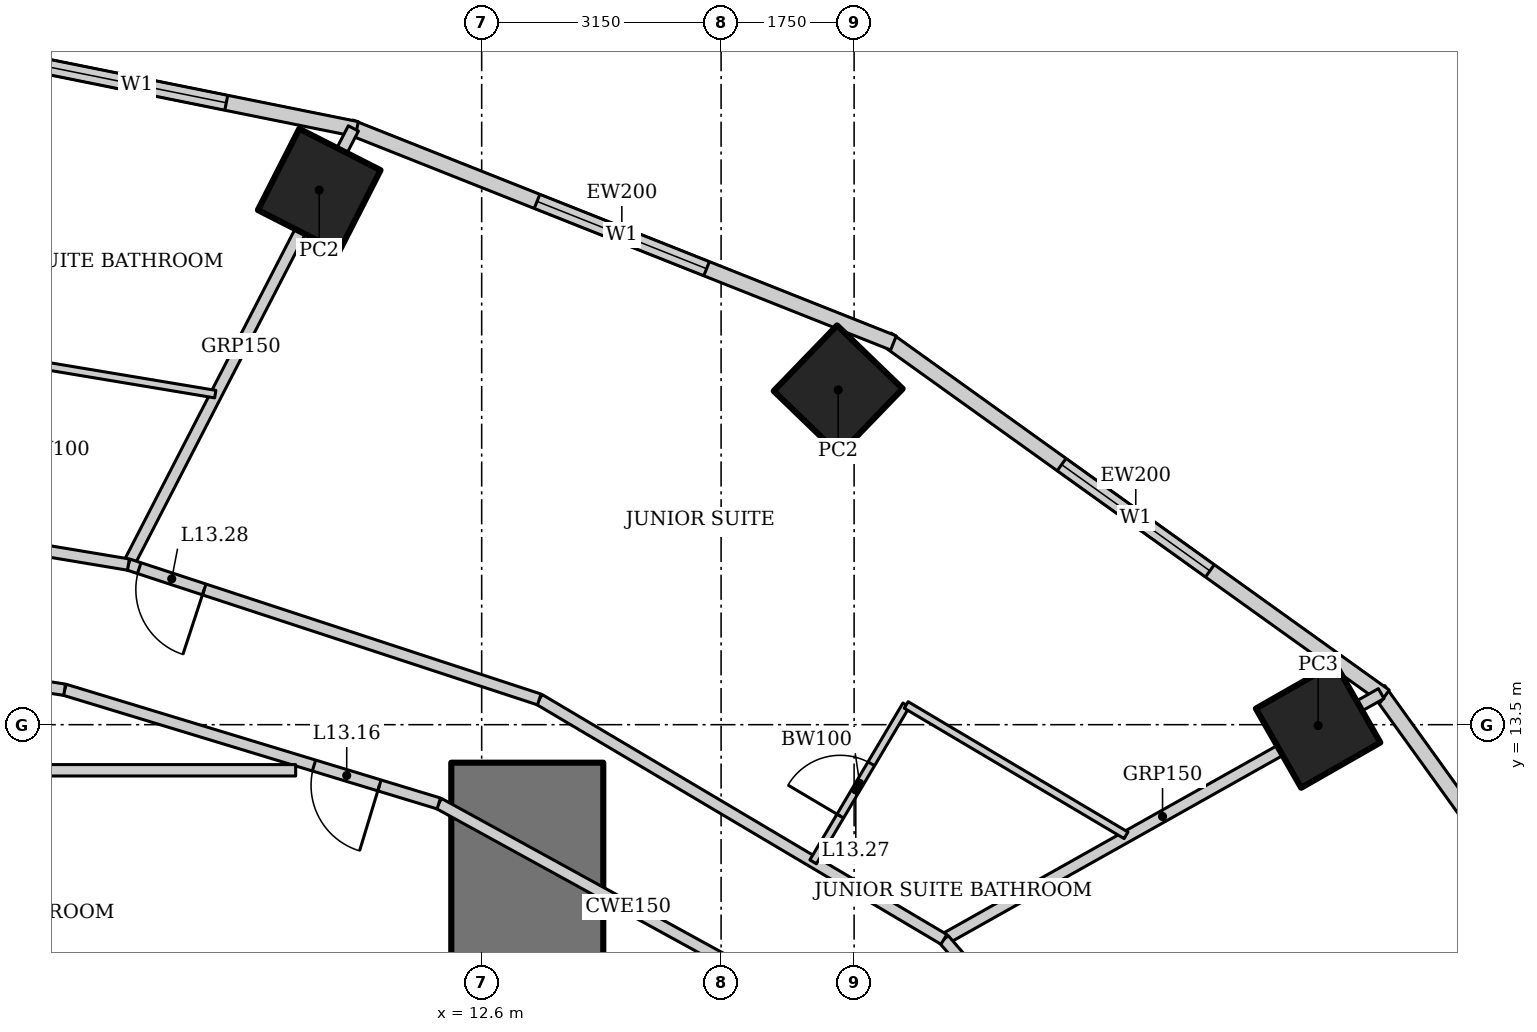
"""IFC4 building model, lengths in metres.
Left out: names, types, materials, properties, quantities, classifications, styles, units other than length and angle.
Written with IfcOpenShell. Run it as: python <this file> out.ifc"""

import sys

from ifc_helpers import new_model, si_unit, direction, frame, frame_2d, origin, origin_2d, place, context, subcontext, project, spatial, rectangle, hollow_rectangle, extrude, element, fill, save


model = new_model("IFC4")
c1 = context("Model", 3, precision=1e-05, world=origin(), true_north=direction((0.0, 1.0)))
c2 = subcontext(c1, "Body", "Model", "MODEL_VIEW")
j1 = project(units=[si_unit("LENGTHUNIT", "METRE"), si_unit("PLANEANGLEUNIT", "RADIAN")], contexts=[c1])
p1 = place(None, origin())
s1 = spatial("IfcSite", under=j1, at=p1, CompositionType="ELEMENT")
p2 = place(p1, origin())
s2 = spatial("IfcBuilding", under=s1, at=p2, CompositionType="ELEMENT")
p3 = place(p2, frame((0.0, 0.0, 62.2)))
s3 = spatial("IfcBuildingStorey", under=s2, at=p3, CompositionType="ELEMENT", Elevation=62.2)
p4 = place(p3, frame((23.605, 13.489, 0.0), z_axis=(0.0, 0.0, 1.0), x_axis=(0.86824298017, 0.496139221777, 0.0)))
e1 = element("IfcColumn", 1, at=p4, inside=s3, PredefinedType="COLUMN", context=c2, shape_type="SweptSolid", body=[
    extrude(hollow_rectangle(XDim=1.2, YDim=1.2, WallThickness=0.12, at=origin_2d()), origin(), (0.0, 0.0, 1.0), 3.6),
])
for number, where, z_axis, x_axis in (
    (2, (17.291, 17.905, 0.0), (0.0, 0.0, 1.0), (0.695, 0.719, 0.0)),
    (3, (10.463, 20.534, 0.0), (0.0, 0.0, 1.0), (0.454, 0.891, 0.0)),
):
    element("IfcColumn", number, at=place(p3, frame(where, z_axis=z_axis, x_axis=x_axis)), inside=s3, PredefinedType="COLUMN", context=c2, shape_type="SweptSolid", body=[
        extrude(hollow_rectangle(XDim=1.2, YDim=1.2, WallThickness=0.1, at=origin_2d()), origin(), (0.0, 0.0, 1.0), 3.6),
    ])
p5 = place(p3, frame((13.2, -13.0, 0.0), z_axis=(0.0, 0.0, 1.0), x_axis=(0.0, 1.0, 0.0)))
e4 = element("IfcWall", 4, at=p5, inside=s3, PredefinedType="SHEAR", context=c2, shape_type="SweptSolid", body=[
    extrude(rectangle(XDim=26.0, YDim=2.0, at=frame_2d((13.0, 0.0))), origin(), (0.0, 0.0, 1.0), 3.6),
])
p6 = place(p5, frame((12.1, 0.0, 0.0)))
e5 = element("IfcOpeningElement", 5, at=p6, cuts=e4, PredefinedType="OPENING", context=c2, shape_type="SweptSolid", body=[
    extrude(rectangle(XDim=1.8, YDim=2.1, at=frame_2d((0.9, 1.05))), frame((0.0, 1.01, 0.0), z_axis=(0.0, -1.0, 0.0), x_axis=(1.0, 0.0, 0.0)), (0.0, 0.0, 1.0), 2.02),
])
p7 = place(p3, frame((29.26, 7.2, 0.0), z_axis=(0.0, 0.0, 1.0), x_axis=(-0.583937613703, 0.811798536155, 0.0)))
e6 = element("IfcWall", 6, at=p7, inside=s3, PredefinedType="SOLIDWALL", context=c2, shape_type="SweptSolid", body=[
    extrude(rectangle(XDim=8.323, YDim=0.2, at=frame_2d((4.162, 0.0))), origin(), (0.0, 0.0, 1.0), 3.45),
])
p8 = place(p7, frame((2.961, 0.0, 0.5)))
e7 = element("IfcOpeningElement", 7, at=p8, cuts=e6, PredefinedType="OPENING", context=c2, shape_type="SweptSolid", body=[
    extrude(rectangle(XDim=2.4, YDim=2.2, at=frame_2d((1.2, 1.1))), frame((0.0, 0.11, 0.0), z_axis=(0.0, -1.0, 0.0), x_axis=(1.0, 0.0, 0.0)), (0.0, 0.0, 1.0), 0.22),
])
p9 = place(p3, frame((24.482, 13.875, 0.0), z_axis=(0.0, 0.0, 1.0), x_axis=(-0.812791321576, 0.582554948112, 0.0)))
e8 = element("IfcWall", 8, at=p9, inside=s3, PredefinedType="SOLIDWALL", context=c2, shape_type="SweptSolid", body=[
    extrude(rectangle(XDim=8.063, YDim=0.2, at=frame_2d((4.032, 0.0))), origin(), (0.0, 0.0, 1.0), 3.45),
])
p10 = place(p9, frame((2.832, 0.0, 0.5)))
e9 = element("IfcOpeningElement", 9, at=p10, cuts=e8, PredefinedType="OPENING", context=c2, shape_type="SweptSolid", body=[
    extrude(rectangle(XDim=2.4, YDim=2.2, at=frame_2d((1.2, 1.1))), frame((0.0, 0.11, 0.0), z_axis=(0.0, -1.0, 0.0), x_axis=(1.0, 0.0, 0.0)), (0.0, 0.0, 1.0), 0.22),
])
p11 = place(p3, frame((18.018, 18.523, 0.0), z_axis=(0.0, 0.0, 1.0), x_axis=(-0.929358351251, 0.369178892895, 0.0)))
e10 = element("IfcWall", 10, at=p11, inside=s3, PredefinedType="SOLIDWALL", context=c2, shape_type="SweptSolid", body=[
    extrude(rectangle(XDim=7.692, YDim=0.2, at=frame_2d((3.846, 0.0))), origin(), (0.0, 0.0, 1.0), 3.45),
])
p12 = place(p11, frame((2.646, 0.0, 0.5)))
e11 = element("IfcOpeningElement", 11, at=p12, cuts=e10, PredefinedType="OPENING", context=c2, shape_type="SweptSolid", body=[
    extrude(rectangle(XDim=2.4, YDim=2.2, at=frame_2d((1.2, 1.1))), frame((0.0, 0.11, 0.0), z_axis=(0.0, -1.0, 0.0), x_axis=(1.0, 0.0, 0.0)), (0.0, 0.0, 1.0), 0.22),
])
p13 = place(p3, frame((10.957, 21.337, 0.0), z_axis=(0.0, 0.0, 1.0), x_axis=(-0.980251657452, 0.197754110105, 0.0)))
e12 = element("IfcWall", 12, at=p13, inside=s3, PredefinedType="SOLIDWALL", context=c2, shape_type="SweptSolid", body=[
    extrude(rectangle(XDim=5.904, YDim=0.2, at=frame_2d((2.952, 0.0))), origin(), (0.0, 0.0, 1.0), 3.45),
])
p14 = place(p13, frame((1.752, 0.0, 0.5)))
e13 = element("IfcOpeningElement", 13, at=p14, cuts=e12, PredefinedType="OPENING", context=c2, shape_type="SweptSolid", body=[
    extrude(rectangle(XDim=2.4, YDim=2.2, at=frame_2d((1.2, 1.1))), frame((0.0, 0.11, 0.0), z_axis=(0.0, -1.0, 0.0), x_axis=(1.0, 0.0, 0.0)), (0.0, 0.0, 1.0), 0.22),
])
p15 = place(p3, frame((24.435, 13.909, 0.0), z_axis=(0.0, 0.0, 1.0), x_axis=(-0.871747379892, -0.489955616001, 0.0)))
e14 = element("IfcWall", 14, at=p15, inside=s3, PredefinedType="PARTITIONING", context=c2, shape_type="SweptSolid", body=[
    extrude(rectangle(XDim=6.6, YDim=0.15, at=frame_2d((3.3, 0.0))), origin(), (0.0, 0.0, 1.0), 2.693),
])
p16 = place(p3, frame((10.912, 21.346, 0.0), z_axis=(0.0, 0.0, 1.0), x_axis=(-0.458384799126, -0.888753833145, 0.0)))
e15 = element("IfcWall", 15, at=p16, inside=s3, PredefinedType="PARTITIONING", context=c2, shape_type="SweptSolid", body=[
    extrude(rectangle(XDim=6.457, YDim=0.15, at=frame_2d((3.229, 0.0))), origin(), (0.0, 0.0, 1.0), 2.528),
])
p17 = place(p3, frame((22.976, 5.729, 0.0), z_axis=(0.0, 0.0, 1.0), x_axis=(-0.655599989166, 0.755108372491, 0.0)))
e16 = element("IfcWall", 16, at=p17, inside=s3, PredefinedType="PARTITIONING", context=c2, shape_type="SweptSolid", body=[
    extrude(rectangle(XDim=6.551, YDim=0.15, at=frame_2d((3.275, 0.0))), origin(), (0.0, 0.0, 1.0), 3.45),
])
p18 = place(p17, frame((0.356, 0.0, 0.0)))
e17 = element("IfcOpeningElement", 17, at=p18, cuts=e16, PredefinedType="OPENING", context=c2, shape_type="SweptSolid", body=[
    extrude(rectangle(XDim=0.9, YDim=2.1, at=frame_2d((0.45, 1.05))), frame((0.0, 0.085, 0.0), z_axis=(0.0, -1.0, 0.0), x_axis=(1.0, 0.0, 0.0)), (0.0, 0.0, 1.0), 0.17),
])
p19 = place(p3, frame((18.681, 10.675, 0.0), z_axis=(0.0, 0.0, 1.0), x_axis=(-0.860147339762, 0.510045639036, 0.0)))
e18 = element("IfcWall", 18, at=p19, inside=s3, PredefinedType="PARTITIONING", context=c2, shape_type="SweptSolid", body=[
    extrude(rectangle(XDim=6.19, YDim=0.15, at=frame_2d((3.095, 0.0))), origin(), (0.0, 0.0, 1.0), 3.45),
])
p20 = place(p3, frame((13.357, 13.832, 0.0), z_axis=(0.0, 0.0, 1.0), x_axis=(-0.950106803111, 0.311924770869, 0.0)))
e19 = element("IfcWall", 19, at=p20, inside=s3, PredefinedType="PARTITIONING", context=c2, shape_type="SweptSolid", body=[
    extrude(rectangle(XDim=5.689, YDim=0.15, at=frame_2d((2.845, 0.0))), origin(), (0.0, 0.0, 1.0), 3.45),
])
p21 = place(p20, frame((4.639, 0.0, 0.0)))
e20 = element("IfcOpeningElement", 20, at=p21, cuts=e19, PredefinedType="OPENING", context=c2, shape_type="SweptSolid", body=[
    extrude(rectangle(XDim=0.9, YDim=2.1, at=frame_2d((0.45, 1.05))), frame((0.0, 0.085, 0.0), z_axis=(0.0, -1.0, 0.0), x_axis=(1.0, 0.0, 0.0)), (0.0, 0.0, 1.0), 0.17),
])
p22 = place(p3, frame((7.952, 15.607, 0.0), z_axis=(0.0, 0.0, 1.0), x_axis=(-0.98641101506, 0.164296407044, 0.0)))
e21 = element("IfcWall", 21, at=p22, inside=s3, PredefinedType="PARTITIONING", context=c2, shape_type="SweptSolid", body=[
    extrude(rectangle(XDim=4.245, YDim=0.15, at=frame_2d((2.123, 0.0))), origin(), (0.0, 0.0, 1.0), 3.45),
])
p23 = place(p3, frame((17.021, 9.726, 0.0), z_axis=(0.0, 0.0, 1.0), x_axis=(-0.876522084062, 0.481361647986, 0.0)))
e22 = element("IfcWall", 22, at=p23, inside=s3, PredefinedType="PARTITIONING", context=c2, shape_type="SweptSolid", body=[
    extrude(rectangle(XDim=5.687, YDim=0.15, at=frame_2d((2.844, 0.0))), origin(), (0.0, 0.0, 1.0), 3.45),
])
p24 = place(p3, frame((12.036, 12.464, 0.0), z_axis=(0.0, 0.0, 1.0), x_axis=(-0.956795045135, 0.290763205385, 0.0)))
e23 = element("IfcWall", 23, at=p24, inside=s3, PredefinedType="PARTITIONING", context=c2, shape_type="SweptSolid", body=[
    extrude(rectangle(XDim=5.146, YDim=0.15, at=frame_2d((2.573, 0.0))), origin(), (0.0, 0.0, 1.0), 3.45),
])
p25 = place(p24, frame((0.816, 0.0, 0.0)))
e24 = element("IfcOpeningElement", 24, at=p25, cuts=e23, PredefinedType="OPENING", context=c2, shape_type="SweptSolid", body=[
    extrude(rectangle(XDim=0.9, YDim=2.1, at=frame_2d((0.45, 1.05))), frame((0.0, 0.085, 0.0), z_axis=(0.0, -1.0, 0.0), x_axis=(1.0, 0.0, 0.0)), (0.0, 0.0, 1.0), 0.17),
])
p26 = place(p3, frame((7.113, 13.96, 0.0), z_axis=(0.0, 0.0, 1.0), x_axis=(-0.988343461108, 0.152240608529, 0.0)))
e25 = element("IfcWall", 25, at=p26, inside=s3, PredefinedType="PARTITIONING", context=c2, shape_type="SweptSolid", body=[
    extrude(rectangle(XDim=3.801, YDim=0.15, at=frame_2d((1.9, 0.0))), origin(), (0.0, 0.0, 1.0), 3.45),
])
p27 = place(p3, frame((10.153, 12.9, 0.0), z_axis=(0.0, 0.0, 1.0), x_axis=(-1.0, 0.0, 0.0)))
e26 = element("IfcWall", 26, at=p27, inside=s3, PredefinedType="PARTITIONING", context=c2, shape_type="SweptSolid", body=[
    extrude(rectangle(XDim=10.153, YDim=0.15, at=frame_2d((5.076, 0.0))), origin(), (0.0, 0.0, 1.0), 3.45),
])
p28 = place(p3, frame((16.961, 11.695, 0.0), z_axis=(0.0, 0.0, 1.0), x_axis=(0.510075642074, 0.860129548012, 0.0)))
e27 = element("IfcWall", 27, at=p28, inside=s3, PredefinedType="PARTITIONING", context=c2, shape_type="SweptSolid", body=[
    extrude(rectangle(XDim=2.4, YDim=0.1, at=frame_2d((1.2, 0.0))), origin(), (0.0, 0.0, 1.0), 3.45),
])
p29 = place(p28, frame((0.7, 0.0, 0.0)))
e28 = element("IfcOpeningElement", 28, at=p29, cuts=e27, PredefinedType="OPENING", context=c2, shape_type="SweptSolid", body=[
    extrude(rectangle(XDim=0.8, YDim=2.1, at=frame_2d((0.4, 1.05))), frame((0.0, 0.06, 0.0), z_axis=(0.0, -1.0, 0.0), x_axis=(1.0, 0.0, 0.0)), (0.0, 0.0, 1.0), 0.12),
])
p30 = place(p3, frame((18.185, 13.76, 0.0), z_axis=(0.0, 0.0, 1.0), x_axis=(0.860146437071, -0.510047161343, 0.0)))
e29 = element("IfcWall", 29, at=p30, inside=s3, PredefinedType="PARTITIONING", context=c2, shape_type="SweptSolid", body=[
    extrude(rectangle(XDim=3.363, YDim=0.1, at=frame_2d((1.681, 0.0))), origin(), (0.0, 0.0, 1.0), 3.45),
])
p31 = place(p3, frame((6.374, 18.303, 0.0), z_axis=(0.0, 0.0, 1.0), x_axis=(0.98640348956, -0.164341582641, 0.0)))
e30 = element("IfcWall", 30, at=p31, inside=s3, PredefinedType="PARTITIONING", context=c2, shape_type="SweptSolid", body=[
    extrude(rectangle(XDim=2.759, YDim=0.1, at=frame_2d((1.379, 0.0))), origin(), (0.0, 0.0, 1.0), 3.45),
])
p32 = place(p10, origin())
e31 = element("IfcWindow", 31, at=p32, inside=s3, PartitioningType="SINGLE_PANEL", PredefinedType="WINDOW", context=c2, shape_type="SweptSolid", body=[
    extrude(rectangle(XDim=2.4, YDim=2.2, at=frame_2d((1.2, 1.1))), frame((0.0, 0.03, 0.0), z_axis=(0.0, -1.0, 0.0), x_axis=(1.0, 0.0, 0.0)), (0.0, 0.0, 1.0), 0.06),
])
fill(e9, e31)
p33 = place(p12, origin())
e32 = element("IfcWindow", 32, at=p33, inside=s3, PartitioningType="SINGLE_PANEL", PredefinedType="WINDOW", context=c2, shape_type="SweptSolid", body=[
    extrude(rectangle(XDim=2.4, YDim=2.2, at=frame_2d((1.2, 1.1))), frame((0.0, 0.03, 0.0), z_axis=(0.0, -1.0, 0.0), x_axis=(1.0, 0.0, 0.0)), (0.0, 0.0, 1.0), 0.06),
])
fill(e11, e32)
p34 = place(p14, origin())
e33 = element("IfcWindow", 33, at=p34, inside=s3, PartitioningType="SINGLE_PANEL", PredefinedType="WINDOW", context=c2, shape_type="SweptSolid", body=[
    extrude(rectangle(XDim=2.4, YDim=2.2, at=frame_2d((1.2, 1.1))), frame((0.0, 0.03, 0.0), z_axis=(0.0, -1.0, 0.0), x_axis=(1.0, 0.0, 0.0)), (0.0, 0.0, 1.0), 0.06),
])
fill(e13, e33)
p35 = place(p25, origin())
e34 = element("IfcDoor", 34, at=p35, inside=s3, OperationType="SINGLE_SWING_LEFT", PredefinedType="DOOR", context=c2, shape_type="SweptSolid", body=[
    extrude(rectangle(XDim=0.9, YDim=2.1, at=frame_2d((0.45, 1.05))), frame((0.0, 0.025, 0.0), z_axis=(0.0, -1.0, 0.0), x_axis=(1.0, 0.0, 0.0)), (0.0, 0.0, 1.0), 0.05),
])
fill(e24, e34)
p36 = place(p29, origin())
e35 = element("IfcDoor", 35, at=p36, inside=s3, OperationType="SINGLE_SWING_LEFT", PredefinedType="DOOR", context=c2, shape_type="SweptSolid", body=[
    extrude(rectangle(XDim=0.8, YDim=2.1, at=frame_2d((0.4, 1.05))), frame((0.0, 0.025, 0.0), z_axis=(0.0, -1.0, 0.0), x_axis=(1.0, 0.0, 0.0)), (0.0, 0.0, 1.0), 0.05),
])
fill(e28, e35)
p37 = place(p21, origin())
e36 = element("IfcDoor", 36, at=p37, inside=s3, OperationType="SINGLE_SWING_LEFT", PredefinedType="DOOR", context=c2, shape_type="SweptSolid", body=[
    extrude(rectangle(XDim=0.9, YDim=2.1, at=frame_2d((0.45, 1.05))), frame((0.0, 0.025, 0.0), z_axis=(0.0, -1.0, 0.0), x_axis=(1.0, 0.0, 0.0)), (0.0, 0.0, 1.0), 0.05),
])
fill(e20, e36)
save(model, sys.argv[1])
